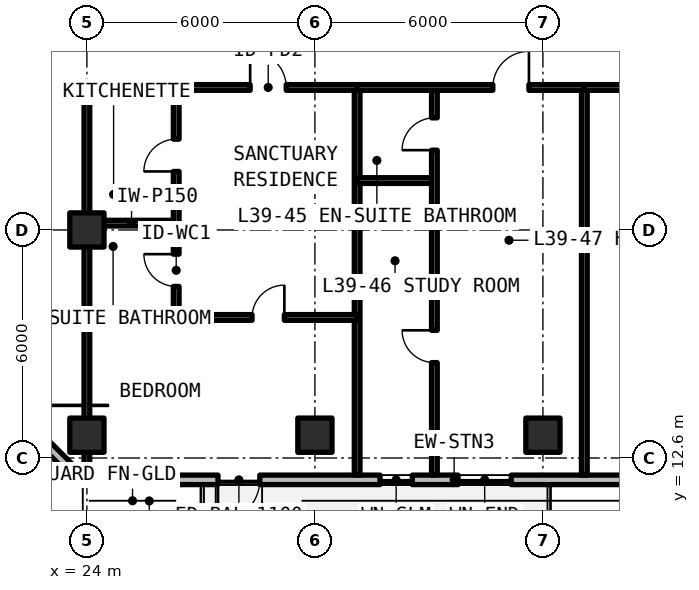
"""IFC4 building model, lengths in metres.
Left out: names, types, materials, properties, quantities, classifications, styles, units other than length and angle.
Written with IfcOpenShell. Run it as: python <this file> out.ifc"""

import sys

from ifc_helpers import new_model, si_unit, direction, frame, frame_2d, origin, origin_2d, place, context, subcontext, project, spatial, rectangle, extrude, element, fill, save


model = new_model("IFC4")
c1 = context("Model", 3, precision=1e-05, world=origin(), true_north=direction((0.0, 1.0)))
c2 = subcontext(c1, "Body", "Model", "MODEL_VIEW")
j1 = project(units=[si_unit("LENGTHUNIT", "METRE"), si_unit("PLANEANGLEUNIT", "RADIAN")], contexts=[c1])
p1 = place(None, origin())
s1 = spatial("IfcSite", under=j1, at=p1, CompositionType="ELEMENT")
p2 = place(p1, origin())
s2 = spatial("IfcBuilding", under=s1, at=p2, CompositionType="ELEMENT")
p3 = place(p2, frame((0.0, 0.0, 141.9)))
s3 = spatial("IfcBuildingStorey", under=s2, at=p3, CompositionType="ELEMENT", Elevation=141.9)
for number, where, z_axis, x_axis in (
    (1, (24.0, 18.6, 0.0), (0.0, 0.0, 1.0), (1.0, 0.0, 0.0)),
    (2, (24.0, 13.2, 0.0), (0.0, 0.0, 1.0), (1.0, 0.0, 0.0)),
    (3, (30.0, 13.2, 0.0), (0.0, 0.0, 1.0), (1.0, 0.0, 0.0)),
    (4, (36.0, 13.2, 0.0), (0.0, 0.0, 1.0), (1.0, 0.0, 0.0)),
):
    element("IfcColumn", number, at=place(p3, frame(where, z_axis=z_axis, x_axis=x_axis)), inside=s3, PredefinedType="COLUMN", context=c2, shape_type="SweptSolid", body=[
        extrude(rectangle(XDim=0.9, YDim=0.9, at=origin_2d()), origin(), (0.0, 0.0, 1.0), 3.3),
    ])
p4 = place(p3, frame((23.852, 12.025, 0.0), z_axis=(0.0, 0.0, 1.0), x_axis=(1.0, 0.0, 0.0)))
e5 = element("IfcWall", 5, at=p4, inside=s3, PredefinedType="SOLIDWALL", context=c2, shape_type="SweptSolid", body=[
    extrude(rectangle(XDim=19.623, YDim=0.25, at=frame_2d((9.812, 0.0))), origin(), (0.0, 0.0, 1.0), 3.08),
])
p5 = place(p4, frame((3.598, 0.0, 0.0)))
e6 = element("IfcOpeningElement", 6, at=p5, cuts=e5, PredefinedType="OPENING", context=c2, shape_type="SweptSolid", body=[
    extrude(rectangle(XDim=1.1, YDim=2.15, at=frame_2d((0.55, 1.075))), frame((0.0, 0.135, 0.0), z_axis=(0.0, -1.0, 0.0), x_axis=(1.0, 0.0, 0.0)), (0.0, 0.0, 1.0), 0.27),
])
p6 = place(p4, frame((7.861, 0.0, 0.78)))
e7 = element("IfcOpeningElement", 7, at=p6, cuts=e5, PredefinedType="OPENING", context=c2, shape_type="SweptSolid", body=[
    extrude(rectangle(XDim=0.85, YDim=1.65, at=frame_2d((0.425, 0.825))), frame((0.0, 0.135, 0.0), z_axis=(0.0, -1.0, 0.0), x_axis=(1.0, 0.0, 0.0)), (0.0, 0.0, 1.0), 0.27),
])
p7 = place(p4, frame((9.915, 0.0, 0.78)))
e8 = element("IfcOpeningElement", 8, at=p7, cuts=e5, PredefinedType="OPENING", context=c2, shape_type="SweptSolid", body=[
    extrude(rectangle(XDim=1.4, YDim=1.65, at=frame_2d((0.7, 0.825))), frame((0.0, 0.135, 0.0), z_axis=(0.0, -1.0, 0.0), x_axis=(1.0, 0.0, 0.0)), (0.0, 0.0, 1.0), 0.27),
])
p8 = place(p4, frame((15.533, 0.0, 0.78)))
e9 = element("IfcOpeningElement", 9, at=p8, cuts=e5, PredefinedType="OPENING", context=c2, shape_type="SweptSolid", body=[
    extrude(rectangle(XDim=1.8, YDim=1.66, at=frame_2d((0.9, 0.83))), frame((0.0, 0.135, 0.0), z_axis=(0.0, -1.0, 0.0), x_axis=(1.0, 0.0, 0.0)), (0.0, 0.0, 1.0), 0.27),
])
p9 = place(p3, frame((19.725, 16.152, 0.0), z_axis=(0.0, 0.0, 1.0), x_axis=(0.70708586489, -0.707127696864, 0.0)))
e10 = element("IfcWall", 10, at=p9, inside=s3, PredefinedType="SOLIDWALL", context=c2, shape_type="SweptSolid", body=[
    extrude(rectangle(XDim=5.836, YDim=0.25, at=frame_2d((2.918, 0.0))), origin(), (0.0, 0.0, 1.0), 3.08),
])
p10 = place(p9, frame((0.898, 0.0, 0.78)))
e11 = element("IfcOpeningElement", 11, at=p10, cuts=e10, PredefinedType="OPENING", context=c2, shape_type="SweptSolid", body=[
    extrude(rectangle(XDim=3.4, YDim=1.66, at=frame_2d((1.7, 0.83))), frame((0.0, 0.135, 0.0), z_axis=(0.0, -1.0, 0.0), x_axis=(1.0, 0.0, 0.0)), (0.0, 0.0, 1.0), 0.27),
])
for number, where, z_axis, x_axis in (
    (12, (24.0, 12.15, 0.0), (0.0, 0.0, 1.0), (0.0, 1.0, 0.0)),
    (13, (31.112, 12.15, 0.0), (0.0, 0.0, 1.0), (0.0, 1.0, 0.0)),
):
    element("IfcWall", number, at=place(p3, frame(where, z_axis=z_axis, x_axis=x_axis)), inside=s3, PredefinedType="SOLIDWALL", context=c2, shape_type="SweptSolid", body=[
        extrude(rectangle(XDim=10.2, YDim=0.15, at=frame_2d((5.1, 0.0))), origin(), (0.0, 0.0, 1.0), 2.35),
    ])
p11 = place(p3, frame((24.0, 18.779, 0.0), z_axis=(0.0, 0.0, 1.0), x_axis=(1.0, 0.0, 0.0)))
e14 = element("IfcWall", 14, at=p11, inside=s3, PredefinedType="PARTITIONING", context=c2, shape_type="SweptSolid", body=[
    extrude(rectangle(XDim=2.35, YDim=0.15, at=frame_2d((1.175, 0.0))), origin(), (0.0, 0.0, 1.0), 2.35),
])
p12 = place(p3, frame((26.35, 16.298, 0.0), z_axis=(0.0, 0.0, 1.0), x_axis=(0.0, 1.0, 0.0)))
e15 = element("IfcWall", 15, at=p12, inside=s3, PredefinedType="PARTITIONING", context=c2, shape_type="SweptSolid", body=[
    extrude(rectangle(XDim=6.052, YDim=0.15, at=frame_2d((3.026, 0.0))), origin(), (0.0, 0.0, 1.0), 2.35),
])
p13 = place(p12, frame((0.816, 0.0, 0.0)))
e16 = element("IfcOpeningElement", 16, at=p13, cuts=e15, PredefinedType="OPENING", context=c2, shape_type="SweptSolid", body=[
    extrude(rectangle(XDim=0.85, YDim=2.1, at=frame_2d((0.425, 1.05))), frame((0.0, 0.085, 0.0), z_axis=(0.0, -1.0, 0.0), x_axis=(1.0, 0.0, 0.0)), (0.0, 0.0, 1.0), 0.17),
])
p14 = place(p12, frame((3.842, 0.0, 0.0)))
e17 = element("IfcOpeningElement", 17, at=p14, cuts=e15, PredefinedType="OPENING", context=c2, shape_type="SweptSolid", body=[
    extrude(rectangle(XDim=0.85, YDim=2.1, at=frame_2d((0.425, 1.05))), frame((0.0, 0.085, 0.0), z_axis=(0.0, -1.0, 0.0), x_axis=(1.0, 0.0, 0.0)), (0.0, 0.0, 1.0), 0.17),
])
p15 = place(p3, frame((24.0, 16.298, 0.0), z_axis=(0.0, 0.0, 1.0), x_axis=(1.0, 0.0, 0.0)))
e18 = element("IfcWall", 18, at=p15, inside=s3, PredefinedType="PARTITIONING", context=c2, shape_type="SweptSolid", body=[
    extrude(rectangle(XDim=7.112, YDim=0.15, at=frame_2d((3.556, 0.0))), origin(), (0.0, 0.0, 1.0), 2.35),
])
p16 = place(p15, frame((4.346, 0.0, 0.0)))
e19 = element("IfcOpeningElement", 19, at=p16, cuts=e18, PredefinedType="OPENING", context=c2, shape_type="SweptSolid", body=[
    extrude(rectangle(XDim=0.85, YDim=2.1, at=frame_2d((0.425, 1.05))), frame((0.0, 0.085, 0.0), z_axis=(0.0, -1.0, 0.0), x_axis=(1.0, 0.0, 0.0)), (0.0, 0.0, 1.0), 0.17),
])
p17 = place(p3, frame((24.0, 22.35, 0.0), z_axis=(0.0, 0.0, 1.0), x_axis=(1.0, 0.0, 0.0)))
e20 = element("IfcWall", 20, at=p17, inside=s3, PredefinedType="SOLIDWALL", context=c2, shape_type="SweptSolid", body=[
    extrude(rectangle(XDim=7.112, YDim=0.15, at=frame_2d((3.556, 0.0))), origin(), (0.0, 0.0, 1.0), 2.35),
])
p18 = place(p17, frame((4.296, 0.0, 0.0)))
e21 = element("IfcOpeningElement", 21, at=p18, cuts=e20, PredefinedType="OPENING", context=c2, shape_type="SweptSolid", body=[
    extrude(rectangle(XDim=0.95, YDim=2.15, at=frame_2d((0.475, 1.075))), frame((0.0, 0.085, 0.0), z_axis=(0.0, -1.0, 0.0), x_axis=(1.0, 0.0, 0.0)), (0.0, 0.0, 1.0), 0.17),
])
p19 = place(p3, frame((37.09, 12.15, 0.0), z_axis=(0.0, 0.0, 1.0), x_axis=(0.0, 1.0, 0.0)))
e22 = element("IfcWall", 22, at=p19, inside=s3, PredefinedType="SOLIDWALL", context=c2, shape_type="SweptSolid", body=[
    extrude(rectangle(XDim=10.2, YDim=0.15, at=frame_2d((5.1, 0.0))), origin(), (0.0, 0.0, 1.0), 2.35),
])
p20 = place(p3, frame((31.112, 19.9, 0.0), z_axis=(0.0, 0.0, 1.0), x_axis=(1.0, 0.0, 0.0)))
e23 = element("IfcWall", 23, at=p20, inside=s3, PredefinedType="PARTITIONING", context=c2, shape_type="SweptSolid", body=[
    extrude(rectangle(XDim=2.032, YDim=0.15, at=frame_2d((1.016, 0.0))), origin(), (0.0, 0.0, 1.0), 2.35),
])
p21 = place(p3, frame((33.144, 12.15, 0.0), z_axis=(0.0, 0.0, 1.0), x_axis=(0.0, 1.0, 0.0)))
e24 = element("IfcWall", 24, at=p21, inside=s3, PredefinedType="PARTITIONING", context=c2, shape_type="SweptSolid", body=[
    extrude(rectangle(XDim=10.2, YDim=0.15, at=frame_2d((5.1, 0.0))), origin(), (0.0, 0.0, 1.0), 2.35),
])
p22 = place(p21, frame((2.96, 0.0, 0.0)))
e25 = element("IfcOpeningElement", 25, at=p22, cuts=e24, PredefinedType="OPENING", context=c2, shape_type="SweptSolid", body=[
    extrude(rectangle(XDim=0.85, YDim=2.1, at=frame_2d((0.425, 1.05))), frame((0.0, 0.085, 0.0), z_axis=(0.0, -1.0, 0.0), x_axis=(1.0, 0.0, 0.0)), (0.0, 0.0, 1.0), 0.17),
])
p23 = place(p21, frame((8.55, 0.0, 0.0)))
e26 = element("IfcOpeningElement", 26, at=p23, cuts=e24, PredefinedType="OPENING", context=c2, shape_type="SweptSolid", body=[
    extrude(rectangle(XDim=0.85, YDim=2.1, at=frame_2d((0.425, 1.05))), frame((0.0, 0.085, 0.0), z_axis=(0.0, -1.0, 0.0), x_axis=(1.0, 0.0, 0.0)), (0.0, 0.0, 1.0), 0.17),
])
p24 = place(p3, frame((31.112, 22.35, 0.0), z_axis=(0.0, 0.0, 1.0), x_axis=(1.0, 0.0, 0.0)))
e27 = element("IfcWall", 27, at=p24, inside=s3, PredefinedType="SOLIDWALL", context=c2, shape_type="SweptSolid", body=[
    extrude(rectangle(XDim=5.978, YDim=0.15, at=frame_2d((2.989, 0.0))), origin(), (0.0, 0.0, 1.0), 2.35),
])
p25 = place(p24, frame((3.57, 0.0, 0.0)))
e28 = element("IfcOpeningElement", 28, at=p25, cuts=e27, PredefinedType="OPENING", context=c2, shape_type="SweptSolid", body=[
    extrude(rectangle(XDim=0.95, YDim=2.15, at=frame_2d((0.475, 1.075))), frame((0.0, 0.085, 0.0), z_axis=(0.0, -1.0, 0.0), x_axis=(1.0, 0.0, 0.0)), (0.0, 0.0, 1.0), 0.17),
])
p26 = place(p3, frame((37.09, 22.35, 0.0), z_axis=(0.0, 0.0, 1.0), x_axis=(1.0, 0.0, 0.0)))
e29 = element("IfcWall", 29, at=p26, inside=s3, PredefinedType="SOLIDWALL", context=c2, shape_type="SweptSolid", body=[
    extrude(rectangle(XDim=6.39, YDim=0.15, at=frame_2d((3.195, 0.0))), origin(), (0.0, 0.0, 1.0), 2.35),
])
p27 = place(p26, frame((2.645, 0.0, 0.0)))
e30 = element("IfcOpeningElement", 30, at=p27, cuts=e29, PredefinedType="OPENING", context=c2, shape_type="SweptSolid", body=[
    extrude(rectangle(XDim=1.1, YDim=2.15, at=frame_2d((0.55, 1.075))), frame((0.0, 0.085, 0.0), z_axis=(0.0, -1.0, 0.0), x_axis=(1.0, 0.0, 0.0)), (0.0, 0.0, 1.0), 0.17),
])
p28 = place(p5, frame((1.1, 0.0, 0.0), z_axis=(0.0, 0.0, 1.0), x_axis=(-1.0, 0.0, 0.0)))
e31 = element("IfcDoor", 31, at=p28, inside=s3, OperationType="SINGLE_SWING_RIGHT", PredefinedType="DOOR", context=c2, shape_type="SweptSolid", body=[
    extrude(rectangle(XDim=1.1, YDim=2.15, at=frame_2d((0.55, 1.075))), frame((0.0, 0.025, 0.0), z_axis=(0.0, -1.0, 0.0), x_axis=(1.0, 0.0, 0.0)), (0.0, 0.0, 1.0), 0.05),
])
fill(e6, e31)
p29 = place(p6, origin())
e32 = element("IfcWindow", 32, at=p29, inside=s3, PartitioningType="SINGLE_PANEL", PredefinedType="WINDOW", context=c2, shape_type="SweptSolid", body=[
    extrude(rectangle(XDim=0.85, YDim=1.65, at=frame_2d((0.425, 0.825))), frame((0.0, 0.03, 0.0), z_axis=(0.0, -1.0, 0.0), x_axis=(1.0, 0.0, 0.0)), (0.0, 0.0, 1.0), 0.06),
])
fill(e7, e32)
p30 = place(p7, origin())
e33 = element("IfcWindow", 33, at=p30, inside=s3, PartitioningType="SINGLE_PANEL", PredefinedType="WINDOW", context=c2, shape_type="SweptSolid", body=[
    extrude(rectangle(XDim=1.4, YDim=1.65, at=frame_2d((0.7, 0.825))), frame((0.0, 0.03, 0.0), z_axis=(0.0, -1.0, 0.0), x_axis=(1.0, 0.0, 0.0)), (0.0, 0.0, 1.0), 0.06),
])
fill(e8, e33)
p31 = place(p13, origin())
e34 = element("IfcDoor", 34, at=p31, inside=s3, OperationType="SINGLE_SWING_RIGHT", PredefinedType="DOOR", context=c2, shape_type="SweptSolid", body=[
    extrude(rectangle(XDim=0.85, YDim=2.1, at=frame_2d((0.425, 1.05))), frame((0.0, 0.025, 0.0), z_axis=(0.0, -1.0, 0.0), x_axis=(1.0, 0.0, 0.0)), (0.0, 0.0, 1.0), 0.05),
])
fill(e16, e34)
p32 = place(p14, origin())
e35 = element("IfcDoor", 35, at=p32, inside=s3, OperationType="SINGLE_SWING_LEFT", PredefinedType="DOOR", context=c2, shape_type="SweptSolid", body=[
    extrude(rectangle(XDim=0.85, YDim=2.1, at=frame_2d((0.425, 1.05))), frame((0.0, 0.025, 0.0), z_axis=(0.0, -1.0, 0.0), x_axis=(1.0, 0.0, 0.0)), (0.0, 0.0, 1.0), 0.05),
])
fill(e17, e35)
p33 = place(p16, origin())
e36 = element("IfcDoor", 36, at=p33, inside=s3, OperationType="SINGLE_SWING_RIGHT", PredefinedType="DOOR", context=c2, shape_type="SweptSolid", body=[
    extrude(rectangle(XDim=0.85, YDim=2.1, at=frame_2d((0.425, 1.05))), frame((0.0, 0.025, 0.0), z_axis=(0.0, -1.0, 0.0), x_axis=(1.0, 0.0, 0.0)), (0.0, 0.0, 1.0), 0.05),
])
fill(e19, e36)
p34 = place(p18, origin())
e37 = element("IfcDoor", 37, at=p34, inside=s3, OperationType="SINGLE_SWING_LEFT", PredefinedType="DOOR", context=c2, shape_type="SweptSolid", body=[
    extrude(rectangle(XDim=0.95, YDim=2.15, at=frame_2d((0.475, 1.075))), frame((0.0, 0.025, 0.0), z_axis=(0.0, -1.0, 0.0), x_axis=(1.0, 0.0, 0.0)), (0.0, 0.0, 1.0), 0.05),
])
fill(e21, e37)
p35 = place(p22, origin())
e38 = element("IfcDoor", 38, at=p35, inside=s3, OperationType="SINGLE_SWING_RIGHT", PredefinedType="DOOR", context=c2, shape_type="SweptSolid", body=[
    extrude(rectangle(XDim=0.85, YDim=2.1, at=frame_2d((0.425, 1.05))), frame((0.0, 0.025, 0.0), z_axis=(0.0, -1.0, 0.0), x_axis=(1.0, 0.0, 0.0)), (0.0, 0.0, 1.0), 0.05),
])
fill(e25, e38)
p36 = place(p23, origin())
e39 = element("IfcDoor", 39, at=p36, inside=s3, OperationType="SINGLE_SWING_LEFT", PredefinedType="DOOR", context=c2, shape_type="SweptSolid", body=[
    extrude(rectangle(XDim=0.85, YDim=2.1, at=frame_2d((0.425, 1.05))), frame((0.0, 0.025, 0.0), z_axis=(0.0, -1.0, 0.0), x_axis=(1.0, 0.0, 0.0)), (0.0, 0.0, 1.0), 0.05),
])
fill(e26, e39)
p37 = place(p25, origin())
e40 = element("IfcDoor", 40, at=p37, inside=s3, OperationType="SINGLE_SWING_RIGHT", PredefinedType="DOOR", context=c2, shape_type="SweptSolid", body=[
    extrude(rectangle(XDim=0.95, YDim=2.15, at=frame_2d((0.475, 1.075))), frame((0.0, 0.025, 0.0), z_axis=(0.0, -1.0, 0.0), x_axis=(1.0, 0.0, 0.0)), (0.0, 0.0, 1.0), 0.05),
])
fill(e28, e40)
save(model, sys.argv[1])
